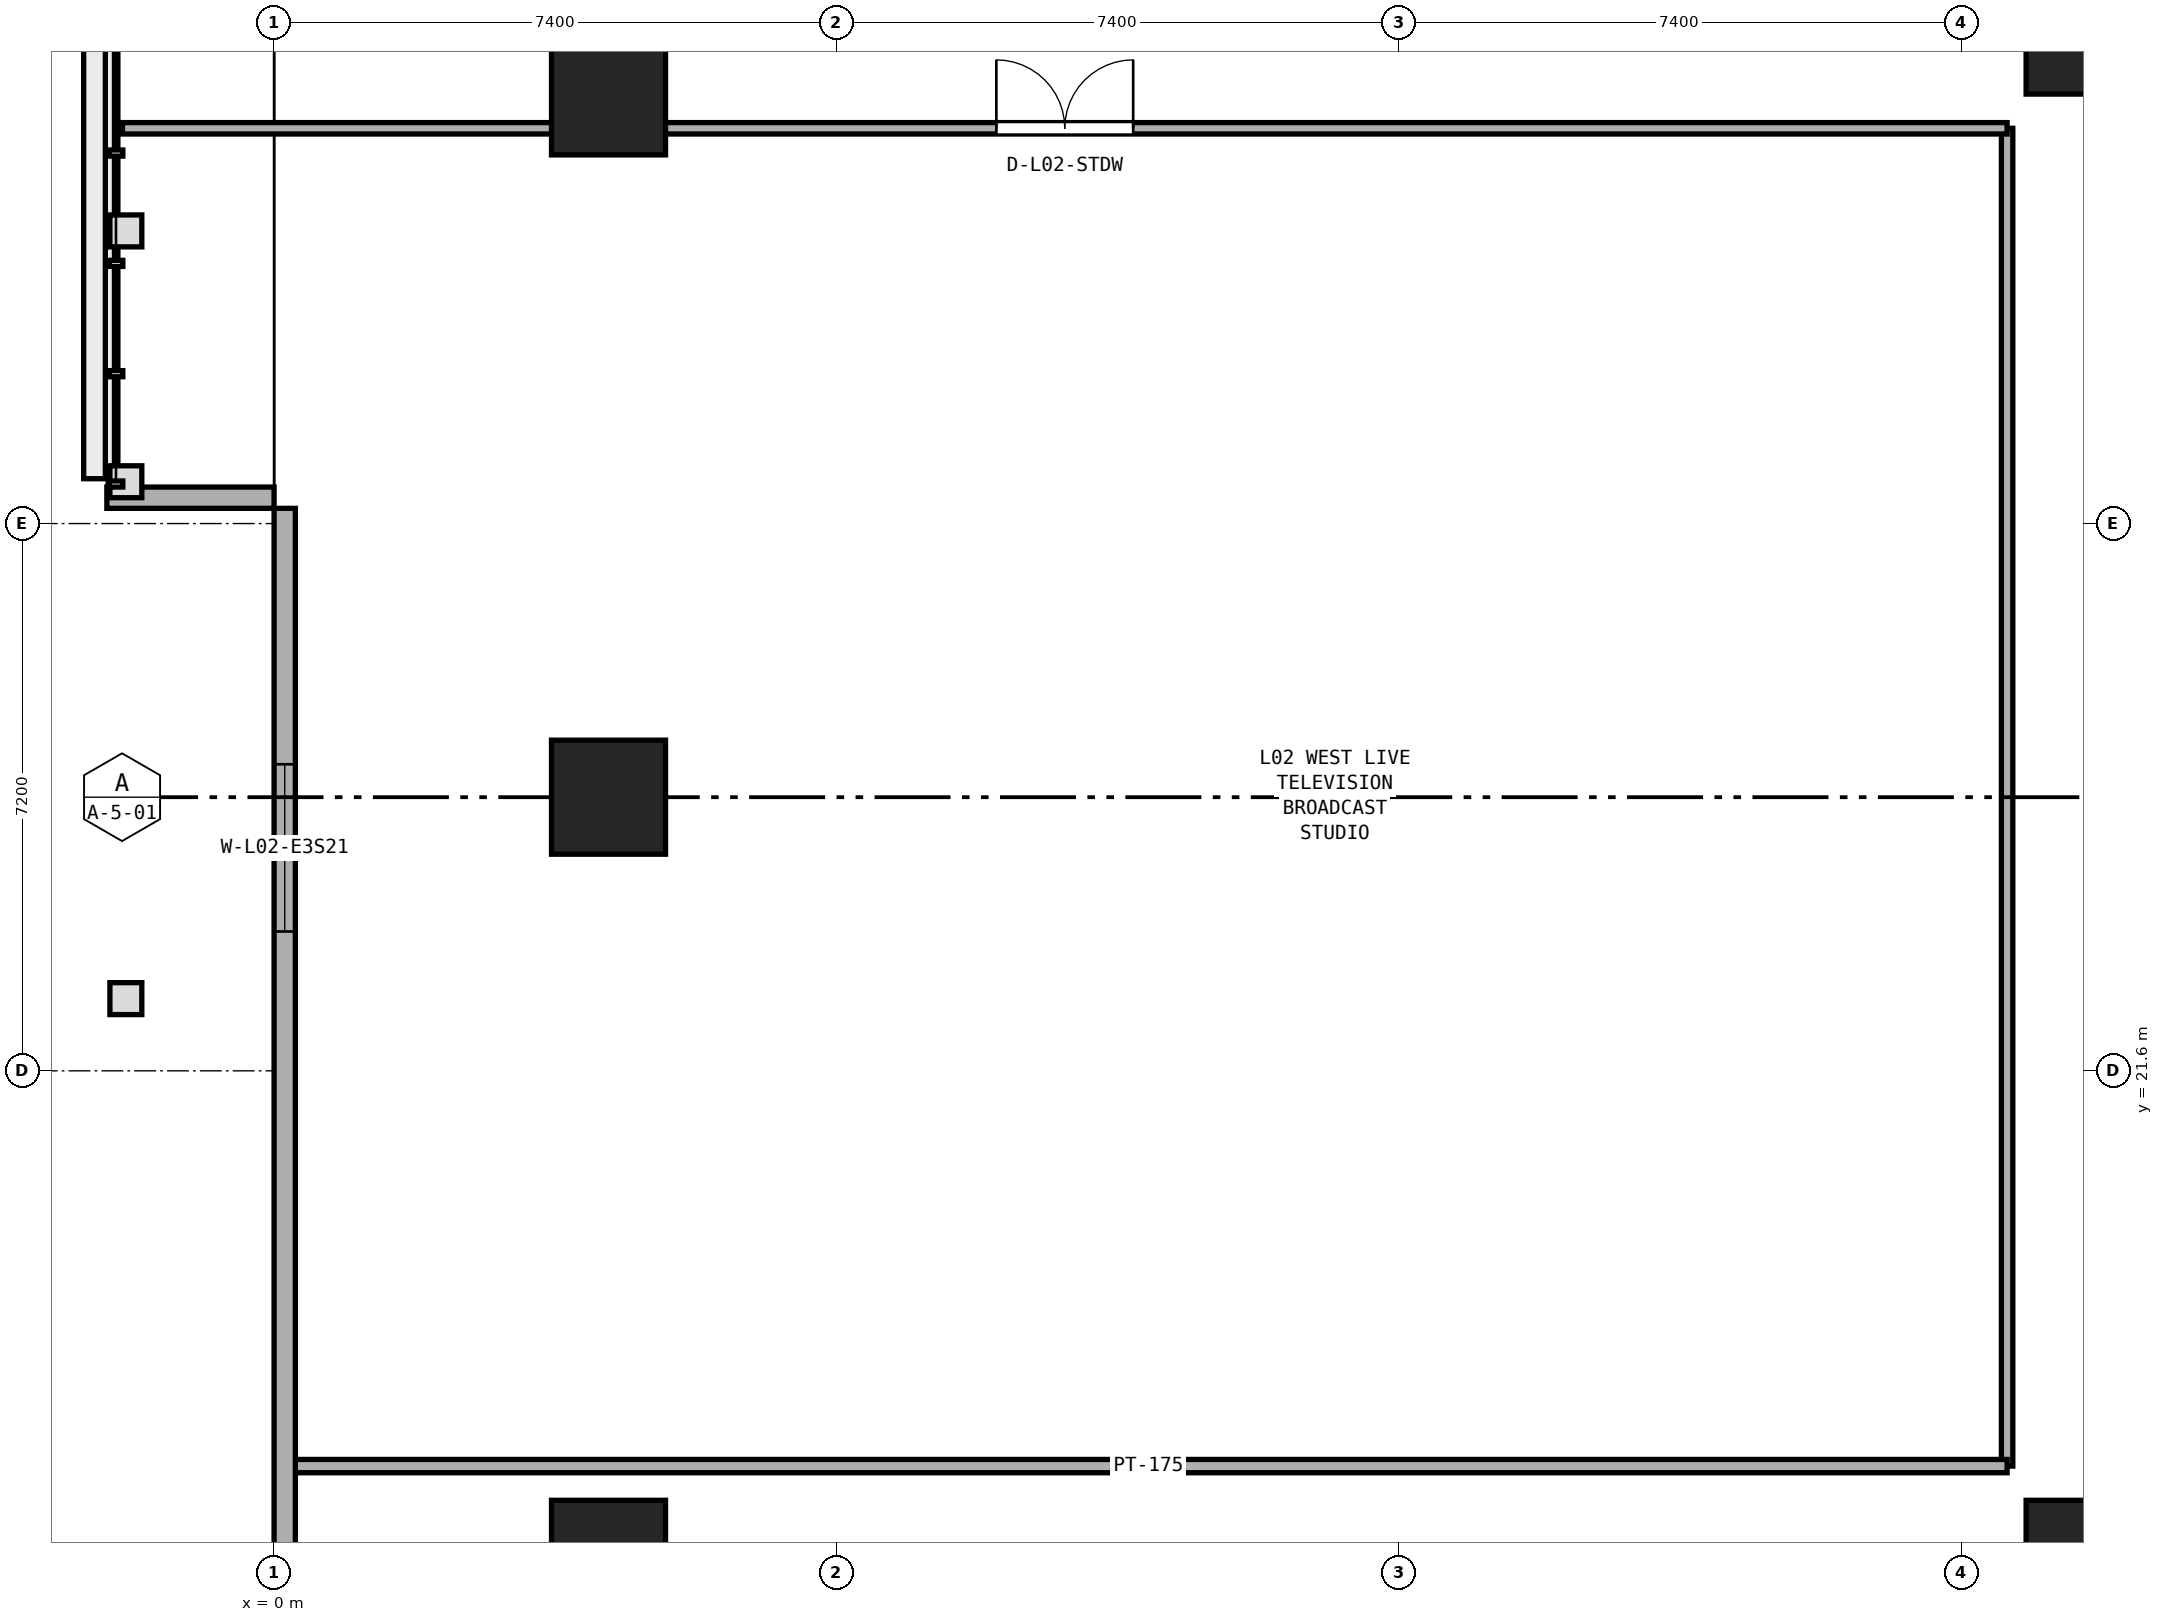
"""IFC4 building model, lengths in metres.
Left out: names, types, materials, properties, quantities, classifications, styles, units other than length and angle.
Written with IfcOpenShell. Run it as: python <this file> out.ifc"""

import sys

from ifc_helpers import new_model, si_unit, direction, frame, frame_2d, origin, origin_2d, place, context, subcontext, project, spatial, rectangle, extrude, element, fill, save


model = new_model("IFC4")
c1 = context("Model", 3, precision=1e-05, world=origin(), true_north=direction((0.0, 1.0)))
c2 = subcontext(c1, "Body", "Model", "MODEL_VIEW")
j1 = project(units=[si_unit("LENGTHUNIT", "METRE"), si_unit("PLANEANGLEUNIT", "RADIAN")], contexts=[c1])
p1 = place(None, origin())
s1 = spatial("IfcSite", under=j1, at=p1, CompositionType="ELEMENT")
p2 = place(p1, origin())
s2 = spatial("IfcBuilding", under=s1, at=p2, CompositionType="ELEMENT")
p3 = place(p2, frame((0.0, 0.0, 10.0)))
s3 = spatial("IfcBuildingStorey", under=s2, at=p3, CompositionType="ELEMENT", Elevation=10.0)
for number, where, z_axis, x_axis in (
    (1, (4.4, 15.2, 0.0), (0.0, 0.0, 1.0), (1.0, 0.0, 0.0)),
    (2, (4.4, 25.2, 0.0), (0.0, 0.0, 1.0), (1.0, 0.0, 0.0)),
    (3, (4.4, 34.4, 0.0), (0.0, 0.0, 1.0), (1.0, 0.0, 0.0)),
    (4, (23.8, 15.2, 0.0), (0.0, 0.0, 1.0), (1.0, 0.0, 0.0)),
    (5, (23.8, 35.2, 0.0), (0.0, 0.0, 1.0), (1.0, 0.0, 0.0)),
):
    element("IfcColumn", number, at=place(p3, frame(where, z_axis=z_axis, x_axis=x_axis)), inside=s3, PredefinedType="COLUMN", context=c2, shape_type="SweptSolid", body=[
        extrude(rectangle(XDim=1.5, YDim=1.5, at=origin_2d()), origin(), (0.0, 0.0, 1.0), 5.0),
    ])
p4 = place(p3, frame((22.8, 16.4, 0.0), z_axis=(0.0, 0.0, 1.0), x_axis=(0.0, 1.0, 0.0)))
e6 = element("IfcWall", 6, at=p4, inside=s3, PredefinedType="PARTITIONING", context=c2, shape_type="SweptSolid", body=[
    extrude(rectangle(XDim=17.6, YDim=0.15, at=frame_2d((8.8, 0.0))), origin(), (0.0, 0.0, 1.0), 4.68),
])
p5 = place(p3, frame((0.205, 16.4, 0.0), z_axis=(0.0, 0.0, 1.0), x_axis=(1.0, 0.0, 0.0)))
e7 = element("IfcWall", 7, at=p5, inside=s3, PredefinedType="PARTITIONING", context=c2, shape_type="SweptSolid", body=[
    extrude(rectangle(XDim=22.595, YDim=0.175, at=frame_2d((11.297, 0.0))), origin(), (0.0, 0.0, 1.0), 4.68),
])
p6 = place(p3, frame((-1.995, 34.0, 0.0), z_axis=(0.0, 0.0, 1.0), x_axis=(1.0, 0.0, 0.0)))
e8 = element("IfcWall", 8, at=p6, inside=s3, PredefinedType="PARTITIONING", context=c2, shape_type="SweptSolid", body=[
    extrude(rectangle(XDim=24.795, YDim=0.15, at=frame_2d((12.397, 0.0))), origin(), (0.0, 0.0, 1.0), 3.78),
])
p7 = place(p6, frame((11.498, 0.0, 0.0)))
e9 = element("IfcOpeningElement", 9, at=p7, cuts=e8, PredefinedType="OPENING", context=c2, shape_type="SweptSolid", body=[
    extrude(rectangle(XDim=1.8, YDim=2.15, at=frame_2d((0.9, 1.075))), frame((0.0, 0.085, 0.0), z_axis=(0.0, -1.0, 0.0), x_axis=(1.0, 0.0, 0.0)), (0.0, 0.0, 1.0), 0.17),
])
p8 = place(p3, frame((0.14, 29.0, 0.0), z_axis=(0.0, 0.0, 1.0), x_axis=(0.0, -1.0, 0.0)))
e10 = element("IfcWall", 10, at=p8, inside=s3, PredefinedType="STANDARD", context=c2, shape_type="SweptSolid", body=[
    extrude(rectangle(XDim=24.8, YDim=0.28, at=frame_2d((12.4, 0.0))), origin(), (0.0, 0.0, 1.0), 3.78),
])
p9 = place(p8, frame((3.367, 0.0, 0.9)))
e11 = element("IfcOpeningElement", 11, at=p9, cuts=e10, PredefinedType="OPENING", context=c2, shape_type="SweptSolid", body=[
    extrude(rectangle(XDim=2.2, YDim=1.95, at=frame_2d((1.1, 0.975))), frame((0.0, 0.15, 0.0), z_axis=(0.0, -1.0, 0.0), x_axis=(1.0, 0.0, 0.0)), (0.0, 0.0, 1.0), 0.3),
])
p10 = place(p8, frame((19.233, 0.0, 0.9)))
e12 = element("IfcOpeningElement", 12, at=p10, cuts=e10, PredefinedType="OPENING", context=c2, shape_type="SweptSolid", body=[
    extrude(rectangle(XDim=2.2, YDim=1.95, at=frame_2d((1.1, 0.975))), frame((0.0, 0.15, 0.0), z_axis=(0.0, -1.0, 0.0), x_axis=(1.0, 0.0, 0.0)), (0.0, 0.0, 1.0), 0.3),
])
p11 = place(p3, frame((-2.2, 29.14, 0.0), z_axis=(0.0, 0.0, 1.0), x_axis=(1.0, 0.0, 0.0)))
e13 = element("IfcWall", 13, at=p11, inside=s3, PredefinedType="STANDARD", context=c2, shape_type="SweptSolid", body=[
    extrude(rectangle(XDim=2.2, YDim=0.28, at=frame_2d((1.1, 0.0))), origin(), (0.0, 0.0, 1.0), 3.987),
])
p12 = place(p7, origin())
e14 = element("IfcDoor", 14, at=p12, inside=s3, OperationType="DOUBLE_DOOR_SINGLE_SWING", PredefinedType="DOOR", context=c2, shape_type="SweptSolid", body=[
    extrude(rectangle(XDim=1.8, YDim=2.15, at=frame_2d((0.9, 1.075))), frame((0.0, 0.025, 0.0), z_axis=(0.0, -1.0, 0.0), x_axis=(1.0, 0.0, 0.0)), (0.0, 0.0, 1.0), 0.05),
])
fill(e9, e14)
p13 = place(p9, origin())
e15 = element("IfcWindow", 15, at=p13, inside=s3, PartitioningType="SINGLE_PANEL", PredefinedType="WINDOW", context=c2, shape_type="SweptSolid", body=[
    extrude(rectangle(XDim=2.2, YDim=1.95, at=frame_2d((1.1, 0.975))), frame((0.0, 0.03, 0.0), z_axis=(0.0, -1.0, 0.0), x_axis=(1.0, 0.0, 0.0)), (0.0, 0.0, 1.0), 0.06),
])
fill(e11, e15)
save(model, sys.argv[1])
